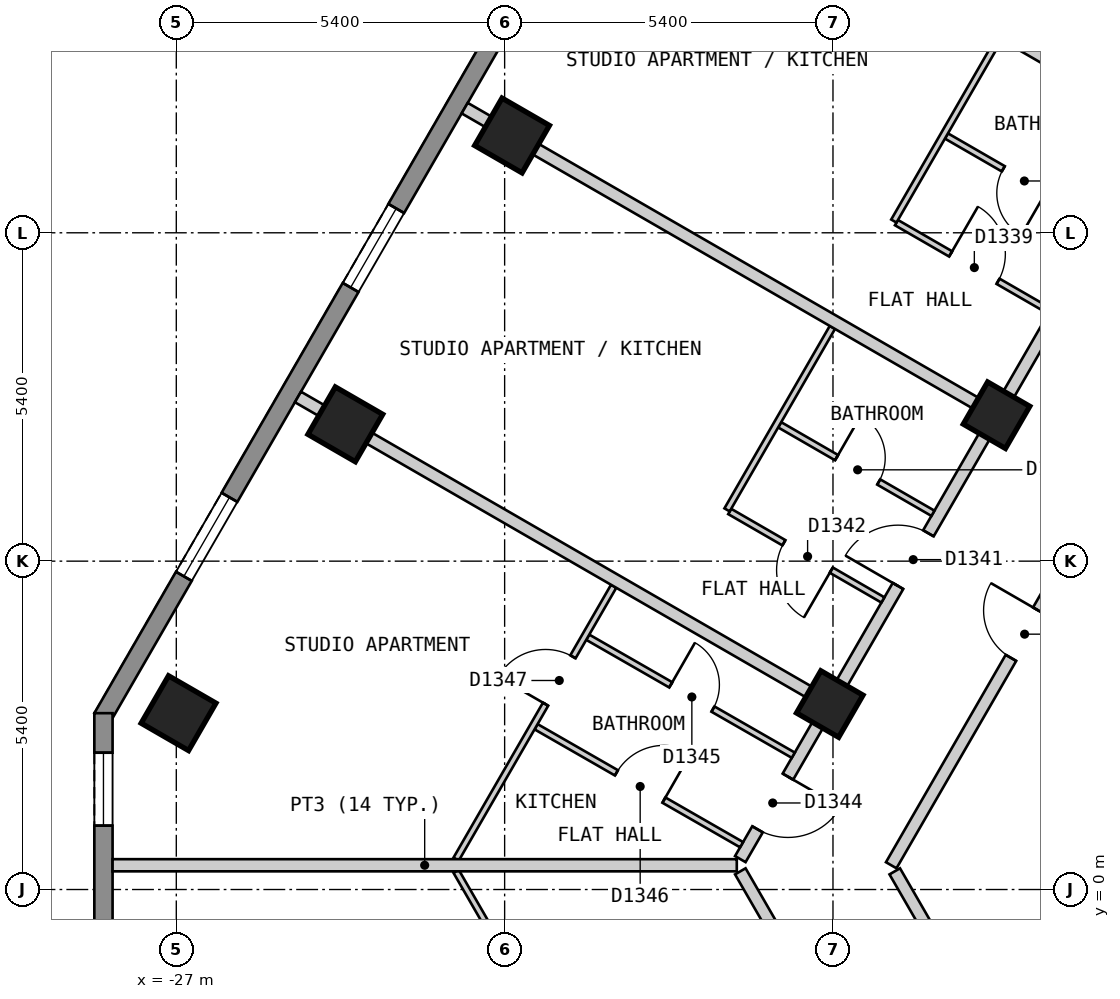
"""IFC4 building model, lengths in metres.
Left out: names, types, materials, properties, quantities, classifications, styles, units other than length and angle.
Written with IfcOpenShell. Run it as: python <this file> out.ifc"""

import sys

from ifc_helpers import new_model, si_unit, direction, frame, frame_2d, origin, origin_2d, place, context, subcontext, project, spatial, polyline, rectangle, outline, extrude, element, fill, save


model = new_model("IFC4")
c1 = context("Model", 3, precision=1e-05, world=origin(), true_north=direction((0.0, 1.0)))
c2 = subcontext(c1, "Body", "Model", "MODEL_VIEW")
j1 = project(units=[si_unit("LENGTHUNIT", "METRE"), si_unit("PLANEANGLEUNIT", "RADIAN")], contexts=[c1])
p1 = place(None, origin())
s1 = spatial("IfcSite", under=j1, at=p1, CompositionType="ELEMENT")
p2 = place(p1, origin())
s2 = spatial("IfcBuilding", under=s1, at=p2, CompositionType="ELEMENT")
p3 = place(p2, frame((0.0, 0.0, 135.6)))
s3 = spatial("IfcBuildingStorey", under=s2, at=p3, CompositionType="ELEMENT", Elevation=135.6)
for number, where, z_axis, x_axis in (
    (1, (-21.478, 12.4, 0.0), (0.0, 0.0, 1.0), (-0.5, -0.866, 0.0)),
    (2, (-24.22, 7.65, 0.0), (0.0, 0.0, 1.0), (-0.5, -0.866, 0.0)),
    (3, (-26.963, 2.9, 0.0), (0.0, 0.0, 1.0), (-0.5, -0.866, 0.0)),
):
    element("IfcColumn", number, at=place(p3, frame(where, z_axis=z_axis, x_axis=x_axis)), inside=s3, PredefinedType="COLUMN", context=c2, shape_type="SweptSolid", body=[
        extrude(rectangle(XDim=0.9, YDim=0.9, at=origin_2d()), origin(), (0.0, 0.0, 1.0), 3.0),
    ])
for number, where, z_axis, x_axis in (
    (4, (-13.51, 7.8, 0.0), (0.0, 0.0, 1.0), (-0.5, -0.866, 0.0)),
    (5, (-16.253, 3.05, 0.0), (0.0, 0.0, 1.0), (-0.5, -0.866, 0.0)),
):
    element("IfcColumn", number, at=place(p3, frame(where, z_axis=z_axis, x_axis=x_axis)), inside=s3, PredefinedType="COLUMN", context=c2, shape_type="SweptSolid", body=[
        extrude(rectangle(XDim=0.8, YDim=0.8, at=origin_2d()), origin(), (0.0, 0.0, 1.0), 3.0),
    ])
p4 = place(p3, frame((-16.555, 23.025, 0.0), z_axis=(0.0, 0.0, 1.0), x_axis=(-0.500020536353, -0.866013546791, 0.0)))
e6 = element("IfcWall", 6, at=p4, inside=s3, PredefinedType="SOLIDWALL", context=c2, shape_type="SweptSolid", body=[
    extrude(outline(polyline([(0.0, -0.15), (23.325, -0.15), (23.245, 0.15), (0.08, 0.15), (0.0, -0.15)])), origin(), (0.0, 0.0, 1.0), 2.7),
])
p5 = place(p4, frame((2.685, 0.0, 0.15)))
e7 = element("IfcOpeningElement", 7, at=p5, cuts=e6, PredefinedType="OPENING", context=c2, shape_type="SweptSolid", body=[
    extrude(rectangle(XDim=1.5, YDim=2.1, at=frame_2d((0.75, 1.05))), frame((0.0, 0.16, 0.0), z_axis=(0.0, -1.0, 0.0), x_axis=(1.0, 0.0, 0.0)), (0.0, 0.0, 1.0), 0.32),
])
p6 = place(p4, frame((8.171, 0.0, 0.15)))
e8 = element("IfcOpeningElement", 8, at=p6, cuts=e6, PredefinedType="OPENING", context=c2, shape_type="SweptSolid", body=[
    extrude(rectangle(XDim=1.5, YDim=2.1, at=frame_2d((0.75, 1.05))), frame((0.0, 0.16, 0.0), z_axis=(0.0, -1.0, 0.0), x_axis=(1.0, 0.0, 0.0)), (0.0, 0.0, 1.0), 0.32),
])
p7 = place(p4, frame((13.655, 0.0, 0.15)))
e9 = element("IfcOpeningElement", 9, at=p7, cuts=e6, PredefinedType="OPENING", context=c2, shape_type="SweptSolid", body=[
    extrude(rectangle(XDim=1.5, YDim=2.1, at=frame_2d((0.75, 1.05))), frame((0.0, 0.16, 0.0), z_axis=(0.0, -1.0, 0.0), x_axis=(1.0, 0.0, 0.0)), (0.0, 0.0, 1.0), 0.32),
])
p8 = place(p4, frame((19.14, 0.0, 0.15)))
e10 = element("IfcOpeningElement", 10, at=p8, cuts=e6, PredefinedType="OPENING", context=c2, shape_type="SweptSolid", body=[
    extrude(rectangle(XDim=1.5, YDim=2.1, at=frame_2d((0.75, 1.05))), frame((0.0, 0.16, 0.0), z_axis=(0.0, -1.0, 0.0), x_axis=(1.0, 0.0, 0.0)), (0.0, 0.0, 1.0), 0.32),
])
p9 = place(p3, frame((-28.198, 2.9, 0.0), z_axis=(0.0, 0.0, 1.0), x_axis=(0.0, -1.0, 0.0)))
e11 = element("IfcWall", 11, at=p9, inside=s3, PredefinedType="SOLIDWALL", context=c2, shape_type="SweptSolid", body=[
    extrude(outline(polyline([(0.0, -0.15), (5.0, -0.15), (4.92, 0.15), (0.08, 0.15), (0.0, -0.15)])), origin(), (0.0, 0.0, 1.0), 2.7),
])
p10 = place(p9, frame((0.65, 0.0, 0.15)))
e12 = element("IfcOpeningElement", 12, at=p10, cuts=e11, PredefinedType="OPENING", context=c2, shape_type="SweptSolid", body=[
    extrude(rectangle(XDim=1.2, YDim=2.1, at=frame_2d((0.6, 1.05))), frame((0.0, 0.16, 0.0), z_axis=(0.0, -1.0, 0.0), x_axis=(1.0, 0.0, 0.0)), (0.0, 0.0, 1.0), 0.32),
])
p11 = place(p3, frame((-15.184, 0.299, 0.0), z_axis=(0.0, 0.0, 1.0), x_axis=(0.500149577091, -0.865939028186, 0.0)))
e13 = element("IfcWall", 13, at=p11, inside=s3, PredefinedType="PARTITIONING", context=c2, shape_type="SweptSolid", body=[
    extrude(rectangle(XDim=3.463, YDim=0.2, at=frame_2d((1.732, 0.0))), origin(), (0.0, 0.0, 1.0), 2.7),
])
p12 = place(p3, frame((-17.724, 0.299, 0.0), z_axis=(0.0, 0.0, 1.0), x_axis=(0.499923815713, -0.866069384335, 0.0)))
e14 = element("IfcWall", 14, at=p12, inside=s3, PredefinedType="PARTITIONING", context=c2, shape_type="SweptSolid", body=[
    extrude(rectangle(XDim=3.289, YDim=0.2, at=frame_2d((1.644, 0.0))), origin(), (0.0, 0.0, 1.0), 2.7),
])
p13 = place(p3, frame((-15.242, 0.399, 0.0), z_axis=(0.0, 0.0, 1.0), x_axis=(0.499953615651, 0.866052182145, 0.0)))
e15 = element("IfcWall", 15, at=p13, inside=s3, PredefinedType="PARTITIONING", context=c2, shape_type="SweptSolid", body=[
    extrude(rectangle(XDim=8.777, YDim=0.2, at=frame_2d((4.388, 0.0))), origin(), (0.0, 0.0, 1.0), 2.7),
])
p14 = place(p13, frame((3.938, 0.0, 0.0)))
e16 = element("IfcOpeningElement", 16, at=p14, cuts=e15, PredefinedType="OPENING", context=c2, shape_type="SweptSolid", body=[
    extrude(rectangle(XDim=0.9, YDim=2.1, at=frame_2d((0.45, 1.05))), frame((0.0, 0.11, 0.0), z_axis=(0.0, -1.0, 0.0), x_axis=(1.0, 0.0, 0.0)), (0.0, 0.0, 1.0), 0.22),
])
p15 = place(p3, frame((-17.724, 0.5, 0.0), z_axis=(0.0, 0.0, 1.0), x_axis=(0.499994801602, 0.86602840506, 0.0)))
e17 = element("IfcWall", 17, at=p15, inside=s3, PredefinedType="PARTITIONING", context=c2, shape_type="SweptSolid", body=[
    extrude(rectangle(XDim=16.916, YDim=0.2, at=frame_2d((8.458, 0.0))), origin(), (0.0, 0.0, 1.0), 2.7),
])
p16 = place(p15, frame((10.672, 0.0, 0.0)))
e18 = element("IfcOpeningElement", 18, at=p16, cuts=e17, PredefinedType="OPENING", context=c2, shape_type="SweptSolid", body=[
    extrude(rectangle(XDim=1.0, YDim=2.1, at=frame_2d((0.5, 1.05))), frame((0.0, 0.11, 0.0), z_axis=(0.0, -1.0, 0.0), x_axis=(1.0, 0.0, 0.0)), (0.0, 0.0, 1.0), 0.22),
])
p17 = place(p15, frame((5.187, 0.0, 0.0)))
e19 = element("IfcOpeningElement", 19, at=p17, cuts=e17, PredefinedType="OPENING", context=c2, shape_type="SweptSolid", body=[
    extrude(rectangle(XDim=1.0, YDim=2.1, at=frame_2d((0.5, 1.05))), frame((0.0, 0.11, 0.0), z_axis=(0.0, -1.0, 0.0), x_axis=(1.0, 0.0, 0.0)), (0.0, 0.0, 1.0), 0.22),
])
p18 = place(p15, frame((0.566, 0.0, 0.0)))
e20 = element("IfcOpeningElement", 20, at=p18, cuts=e17, PredefinedType="OPENING", context=c2, shape_type="SweptSolid", body=[
    extrude(rectangle(XDim=1.0, YDim=2.1, at=frame_2d((0.5, 1.05))), frame((0.0, 0.11, 0.0), z_axis=(0.0, -1.0, 0.0), x_axis=(1.0, 0.0, 0.0)), (0.0, 0.0, 1.0), 0.22),
])
p19 = place(p3, frame((-22.398, 0.299, 0.0), z_axis=(0.0, 0.0, 1.0), x_axis=(0.50004249738, -0.86600086652, 0.0)))
e21 = element("IfcWall", 21, at=p19, inside=s3, PredefinedType="PARTITIONING", context=c2, shape_type="SweptSolid", body=[
    extrude(rectangle(XDim=3.236, YDim=0.1, at=frame_2d((1.618, 0.0))), origin(), (0.0, 0.0, 1.0), 2.7),
])
p20 = place(p3, frame((-17.898, 6.217, 0.0), z_axis=(0.0, 0.0, 1.0), x_axis=(0.86592000186, -0.500182517066, 0.0)))
e22 = element("IfcWall", 22, at=p20, inside=s3, PredefinedType="PARTITIONING", context=c2, shape_type="SweptSolid", body=[
    extrude(rectangle(XDim=2.909, YDim=0.1, at=frame_2d((1.455, 0.0))), origin(), (0.0, 0.0, 1.0), 2.7),
])
p21 = place(p20, frame((1.029, 0.0, 0.0)))
e23 = element("IfcOpeningElement", 23, at=p21, cuts=e22, PredefinedType="OPENING", context=c2, shape_type="SweptSolid", body=[
    extrude(rectangle(XDim=0.9, YDim=2.1, at=frame_2d((0.45, 1.05))), frame((0.0, 0.06, 0.0), z_axis=(0.0, -1.0, 0.0), x_axis=(1.0, 0.0, 0.0)), (0.0, 0.0, 1.0), 0.12),
])
p22 = place(p3, frame((-20.233, 4.149, 0.0), z_axis=(0.0, 0.0, 1.0), x_axis=(0.867293167797, -0.497797711016, 0.0)))
e24 = element("IfcWall", 24, at=p22, inside=s3, PredefinedType="PARTITIONING", context=c2, shape_type="SweptSolid", body=[
    extrude(rectangle(XDim=3.897, YDim=0.1, at=frame_2d((1.948, 0.0))), origin(), (0.0, 0.0, 1.0), 2.7),
])
p23 = place(p22, frame((1.574, 0.0, 0.0)))
e25 = element("IfcOpeningElement", 25, at=p23, cuts=e24, PredefinedType="OPENING", context=c2, shape_type="SweptSolid", body=[
    extrude(rectangle(XDim=0.8, YDim=2.1, at=frame_2d((0.4, 1.05))), frame((0.0, 0.06, 0.0), z_axis=(0.0, -1.0, 0.0), x_axis=(1.0, 0.0, 0.0)), (0.0, 0.0, 1.0), 0.12),
])
p24 = place(p3, frame((-21.083, 2.677, 0.0), z_axis=(0.0, 0.0, 1.0), x_axis=(0.867308690764, -0.497770664991, 0.0)))
e26 = element("IfcWall", 26, at=p24, inside=s3, PredefinedType="PARTITIONING", context=c2, shape_type="SweptSolid", body=[
    extrude(rectangle(XDim=3.897, YDim=0.1, at=frame_2d((1.949, 0.0))), origin(), (0.0, 0.0, 1.0), 2.7),
])
p25 = place(p24, frame((1.524, 0.0, 0.0)))
e27 = element("IfcOpeningElement", 27, at=p25, cuts=e26, PredefinedType="OPENING", context=c2, shape_type="SweptSolid", body=[
    extrude(rectangle(XDim=0.9, YDim=2.1, at=frame_2d((0.45, 1.05))), frame((0.0, 0.06, 0.0), z_axis=(0.0, -1.0, 0.0), x_axis=(1.0, 0.0, 0.0)), (0.0, 0.0, 1.0), 0.12),
])
p26 = place(p3, frame((-17.076, 7.642, 0.0), z_axis=(0.0, 0.0, 1.0), x_axis=(0.866003949776, -0.500037157592, 0.0)))
e28 = element("IfcWall", 28, at=p26, inside=s3, PredefinedType="PARTITIONING", context=c2, shape_type="SweptSolid", body=[
    extrude(rectangle(XDim=2.91, YDim=0.1, at=frame_2d((1.455, 0.0))), origin(), (0.0, 0.0, 1.0), 2.7),
])
p27 = place(p26, frame((1.08, 0.0, 0.0)))
e29 = element("IfcOpeningElement", 29, at=p27, cuts=e28, PredefinedType="OPENING", context=c2, shape_type="SweptSolid", body=[
    extrude(rectangle(XDim=0.8, YDim=2.1, at=frame_2d((0.4, 1.05))), frame((0.0, 0.06, 0.0), z_axis=(0.0, -1.0, 0.0), x_axis=(1.0, 0.0, 0.0)), (0.0, 0.0, 1.0), 0.12),
])
p28 = place(p3, frame((-14.334, 12.392, 0.0), z_axis=(0.0, 0.0, 1.0), x_axis=(0.866003949776, -0.500037157592, 0.0)))
e30 = element("IfcWall", 30, at=p28, inside=s3, PredefinedType="PARTITIONING", context=c2, shape_type="SweptSolid", body=[
    extrude(rectangle(XDim=2.91, YDim=0.1, at=frame_2d((1.455, 0.0))), origin(), (0.0, 0.0, 1.0), 2.7),
])
p29 = place(p28, frame((1.08, 0.0, 0.0)))
e31 = element("IfcOpeningElement", 31, at=p29, cuts=e30, PredefinedType="OPENING", context=c2, shape_type="SweptSolid", body=[
    extrude(rectangle(XDim=0.8, YDim=2.1, at=frame_2d((0.4, 1.05))), frame((0.0, 0.06, 0.0), z_axis=(0.0, -1.0, 0.0), x_axis=(1.0, 0.0, 0.0)), (0.0, 0.0, 1.0), 0.12),
])
p30 = place(p3, frame((-15.156, 10.967, 0.0), z_axis=(0.0, 0.0, 1.0), x_axis=(0.866003949776, -0.500037157592, 0.0)))
e32 = element("IfcWall", 32, at=p30, inside=s3, PredefinedType="PARTITIONING", context=c2, shape_type="SweptSolid", body=[
    extrude(rectangle(XDim=2.91, YDim=0.1, at=frame_2d((1.455, 0.0))), origin(), (0.0, 0.0, 1.0), 2.7),
])
p31 = place(p30, frame((1.029, 0.0, 0.0)))
e33 = element("IfcOpeningElement", 33, at=p31, cuts=e32, PredefinedType="OPENING", context=c2, shape_type="SweptSolid", body=[
    extrude(rectangle(XDim=0.9, YDim=2.1, at=frame_2d((0.45, 1.05))), frame((0.0, 0.06, 0.0), z_axis=(0.0, -1.0, 0.0), x_axis=(1.0, 0.0, 0.0)), (0.0, 0.0, 1.0), 0.12),
])
p32 = place(p3, frame((-17.942, 6.243, 0.0), z_axis=(0.0, 0.0, 1.0), x_axis=(0.49997462182, 0.866040055388, 0.0)))
e34 = element("IfcWall", 34, at=p32, inside=s3, PredefinedType="PARTITIONING", context=c2, shape_type="SweptSolid", body=[
    extrude(rectangle(XDim=3.464, YDim=0.1, at=frame_2d((1.732, 0.0))), origin(), (0.0, 0.0, 1.0), 2.7),
])
p33 = place(p3, frame((-15.199, 10.993, 0.0), z_axis=(0.0, 0.0, 1.0), x_axis=(0.499885210257, 0.866091667531, 0.0)))
e35 = element("IfcWall", 35, at=p33, inside=s3, PredefinedType="PARTITIONING", context=c2, shape_type="SweptSolid", body=[
    extrude(rectangle(XDim=3.463, YDim=0.1, at=frame_2d((1.731, 0.0))), origin(), (0.0, 0.0, 1.0), 2.7),
])
p34 = place(p3, frame((-22.398, 0.499, 0.0), z_axis=(0.0, 0.0, 1.0), x_axis=(0.499984806807, 0.866034175401, 0.0)))
e36 = element("IfcWall", 36, at=p34, inside=s3, PredefinedType="PARTITIONING", context=c2, shape_type="SweptSolid", body=[
    extrude(rectangle(XDim=5.182, YDim=0.1, at=frame_2d((2.591, 0.0))), origin(), (0.0, 0.0, 1.0), 2.7),
])
p35 = place(p34, frame((2.943, 0.0, 0.0)))
e37 = element("IfcOpeningElement", 37, at=p35, cuts=e36, PredefinedType="OPENING", context=c2, shape_type="SweptSolid", body=[
    extrude(rectangle(XDim=0.9, YDim=2.1, at=frame_2d((0.45, 1.05))), frame((0.0, 0.06, 0.0), z_axis=(0.0, -1.0, 0.0), x_axis=(1.0, 0.0, 0.0)), (0.0, 0.0, 1.0), 0.12),
])
p36 = place(p3, frame((-24.999, 8.1, 0.0), z_axis=(0.0, 0.0, 1.0), x_axis=(0.866016855193, -0.500014806302, 0.0)))
e38 = element("IfcWall", 38, at=p36, inside=s3, PredefinedType="PARTITIONING", context=c2, shape_type="SweptSolid", body=[
    extrude(rectangle(XDim=10.0, YDim=0.2, at=frame_2d((5.0, 0.0))), origin(), (0.0, 0.0, 1.0), 2.7),
])
p37 = place(p3, frame((-22.257, 12.85, 0.0), z_axis=(0.0, 0.0, 1.0), x_axis=(0.866047370643, -0.499961950354, 0.0)))
e39 = element("IfcWall", 39, at=p37, inside=s3, PredefinedType="PARTITIONING", context=c2, shape_type="SweptSolid", body=[
    extrude(rectangle(XDim=10.001, YDim=0.2, at=frame_2d((5.0, 0.0))), origin(), (0.0, 0.0, 1.0), 2.7),
])
p38 = place(p3, frame((-19.514, 17.599, 0.0), z_axis=(0.0, 0.0, 1.0), x_axis=(0.866059142644, -0.499941558027, 0.0)))
e40 = element("IfcWall", 40, at=p38, inside=s3, PredefinedType="PARTITIONING", context=c2, shape_type="SweptSolid", body=[
    extrude(rectangle(XDim=9.999, YDim=0.2, at=frame_2d((5.0, 0.0))), origin(), (0.0, 0.0, 1.0), 2.7),
])
p39 = place(p3, frame((-28.048, 0.399, 0.0), z_axis=(0.0, 0.0, 1.0), x_axis=(1.0, 0.0, 0.0)))
e41 = element("IfcWall", 41, at=p39, inside=s3, PredefinedType="PARTITIONING", context=c2, shape_type="SweptSolid", body=[
    extrude(rectangle(XDim=10.266, YDim=0.2, at=frame_2d((5.133, 0.0))), origin(), (0.0, 0.0, 1.0), 2.7),
])
p40 = place(p7, origin())
e42 = element("IfcWindow", 42, at=p40, inside=s3, PartitioningType="SINGLE_PANEL", PredefinedType="WINDOW", context=c2, shape_type="SweptSolid", body=[
    extrude(rectangle(XDim=1.5, YDim=2.1, at=frame_2d((0.75, 1.05))), frame((0.0, 0.03, 0.0), z_axis=(0.0, -1.0, 0.0), x_axis=(1.0, 0.0, 0.0)), (0.0, 0.0, 1.0), 0.06),
])
fill(e9, e42)
p41 = place(p8, origin())
e43 = element("IfcWindow", 43, at=p41, inside=s3, PartitioningType="SINGLE_PANEL", PredefinedType="WINDOW", context=c2, shape_type="SweptSolid", body=[
    extrude(rectangle(XDim=1.5, YDim=2.1, at=frame_2d((0.75, 1.05))), frame((0.0, 0.03, 0.0), z_axis=(0.0, -1.0, 0.0), x_axis=(1.0, 0.0, 0.0)), (0.0, 0.0, 1.0), 0.06),
])
fill(e10, e43)
p42 = place(p10, origin())
e44 = element("IfcWindow", 44, at=p42, inside=s3, PartitioningType="SINGLE_PANEL", PredefinedType="WINDOW", context=c2, shape_type="SweptSolid", body=[
    extrude(rectangle(XDim=1.2, YDim=2.1, at=frame_2d((0.6, 1.05))), frame((0.0, 0.03, 0.0), z_axis=(0.0, -1.0, 0.0), x_axis=(1.0, 0.0, 0.0)), (0.0, 0.0, 1.0), 0.06),
])
fill(e12, e44)
p43 = place(p31, origin())
e45 = element("IfcDoor", 45, at=p43, inside=s3, OperationType="SINGLE_SWING_LEFT", PredefinedType="DOOR", context=c2, shape_type="SweptSolid", body=[
    extrude(rectangle(XDim=0.9, YDim=2.1, at=frame_2d((0.45, 1.05))), frame((0.0, 0.025, 0.0), z_axis=(0.0, -1.0, 0.0), x_axis=(1.0, 0.0, 0.0)), (0.0, 0.0, 1.0), 0.05),
])
fill(e33, e45)
p44 = place(p29, origin())
e46 = element("IfcDoor", 46, at=p44, inside=s3, OperationType="SINGLE_SWING_RIGHT", PredefinedType="DOOR", context=c2, shape_type="SweptSolid", body=[
    extrude(rectangle(XDim=0.8, YDim=2.1, at=frame_2d((0.4, 1.05))), frame((0.0, 0.025, 0.0), z_axis=(0.0, -1.0, 0.0), x_axis=(1.0, 0.0, 0.0)), (0.0, 0.0, 1.0), 0.05),
])
fill(e31, e46)
p45 = place(p17, origin())
e47 = element("IfcDoor", 47, at=p45, inside=s3, OperationType="SINGLE_SWING_LEFT", PredefinedType="DOOR", context=c2, shape_type="SweptSolid", body=[
    extrude(rectangle(XDim=1.0, YDim=2.1, at=frame_2d((0.5, 1.05))), frame((0.0, 0.025, 0.0), z_axis=(0.0, -1.0, 0.0), x_axis=(1.0, 0.0, 0.0)), (0.0, 0.0, 1.0), 0.05),
])
fill(e19, e47)
p46 = place(p21, origin())
e48 = element("IfcDoor", 48, at=p46, inside=s3, OperationType="SINGLE_SWING_RIGHT", PredefinedType="DOOR", context=c2, shape_type="SweptSolid", body=[
    extrude(rectangle(XDim=0.9, YDim=2.1, at=frame_2d((0.45, 1.05))), frame((0.0, 0.025, 0.0), z_axis=(0.0, -1.0, 0.0), x_axis=(1.0, 0.0, 0.0)), (0.0, 0.0, 1.0), 0.05),
])
fill(e23, e48)
p47 = place(p27, origin())
e49 = element("IfcDoor", 49, at=p47, inside=s3, OperationType="SINGLE_SWING_LEFT", PredefinedType="DOOR", context=c2, shape_type="SweptSolid", body=[
    extrude(rectangle(XDim=0.8, YDim=2.1, at=frame_2d((0.4, 1.05))), frame((0.0, 0.025, 0.0), z_axis=(0.0, -1.0, 0.0), x_axis=(1.0, 0.0, 0.0)), (0.0, 0.0, 1.0), 0.05),
])
fill(e29, e49)
p48 = place(p18, origin())
e50 = element("IfcDoor", 50, at=p48, inside=s3, OperationType="SINGLE_SWING_RIGHT", PredefinedType="DOOR", context=c2, shape_type="SweptSolid", body=[
    extrude(rectangle(XDim=1.0, YDim=2.1, at=frame_2d((0.5, 1.05))), frame((0.0, 0.025, 0.0), z_axis=(0.0, -1.0, 0.0), x_axis=(1.0, 0.0, 0.0)), (0.0, 0.0, 1.0), 0.05),
])
fill(e20, e50)
p49 = place(p23, origin())
e51 = element("IfcDoor", 51, at=p49, inside=s3, OperationType="SINGLE_SWING_LEFT", PredefinedType="DOOR", context=c2, shape_type="SweptSolid", body=[
    extrude(rectangle(XDim=0.8, YDim=2.1, at=frame_2d((0.4, 1.05))), frame((0.0, 0.025, 0.0), z_axis=(0.0, -1.0, 0.0), x_axis=(1.0, 0.0, 0.0)), (0.0, 0.0, 1.0), 0.05),
])
fill(e25, e51)
p50 = place(p25, origin())
e52 = element("IfcDoor", 52, at=p50, inside=s3, OperationType="SINGLE_SWING_RIGHT", PredefinedType="DOOR", context=c2, shape_type="SweptSolid", body=[
    extrude(rectangle(XDim=0.9, YDim=2.1, at=frame_2d((0.45, 1.05))), frame((0.0, 0.025, 0.0), z_axis=(0.0, -1.0, 0.0), x_axis=(1.0, 0.0, 0.0)), (0.0, 0.0, 1.0), 0.05),
])
fill(e27, e52)
p51 = place(p35, origin())
e53 = element("IfcDoor", 53, at=p51, inside=s3, OperationType="SINGLE_SWING_LEFT", PredefinedType="DOOR", context=c2, shape_type="SweptSolid", body=[
    extrude(rectangle(XDim=0.9, YDim=2.1, at=frame_2d((0.45, 1.05))), frame((0.0, 0.025, 0.0), z_axis=(0.0, -1.0, 0.0), x_axis=(1.0, 0.0, 0.0)), (0.0, 0.0, 1.0), 0.05),
])
fill(e37, e53)
p52 = place(p14, origin())
e54 = element("IfcDoor", 54, at=p52, inside=s3, OperationType="SINGLE_SWING_RIGHT", PredefinedType="DOOR", context=c2, shape_type="SweptSolid", body=[
    extrude(rectangle(XDim=0.9, YDim=2.1, at=frame_2d((0.45, 1.05))), frame((0.0, 0.025, 0.0), z_axis=(0.0, -1.0, 0.0), x_axis=(1.0, 0.0, 0.0)), (0.0, 0.0, 1.0), 0.05),
])
fill(e16, e54)
save(model, sys.argv[1])
